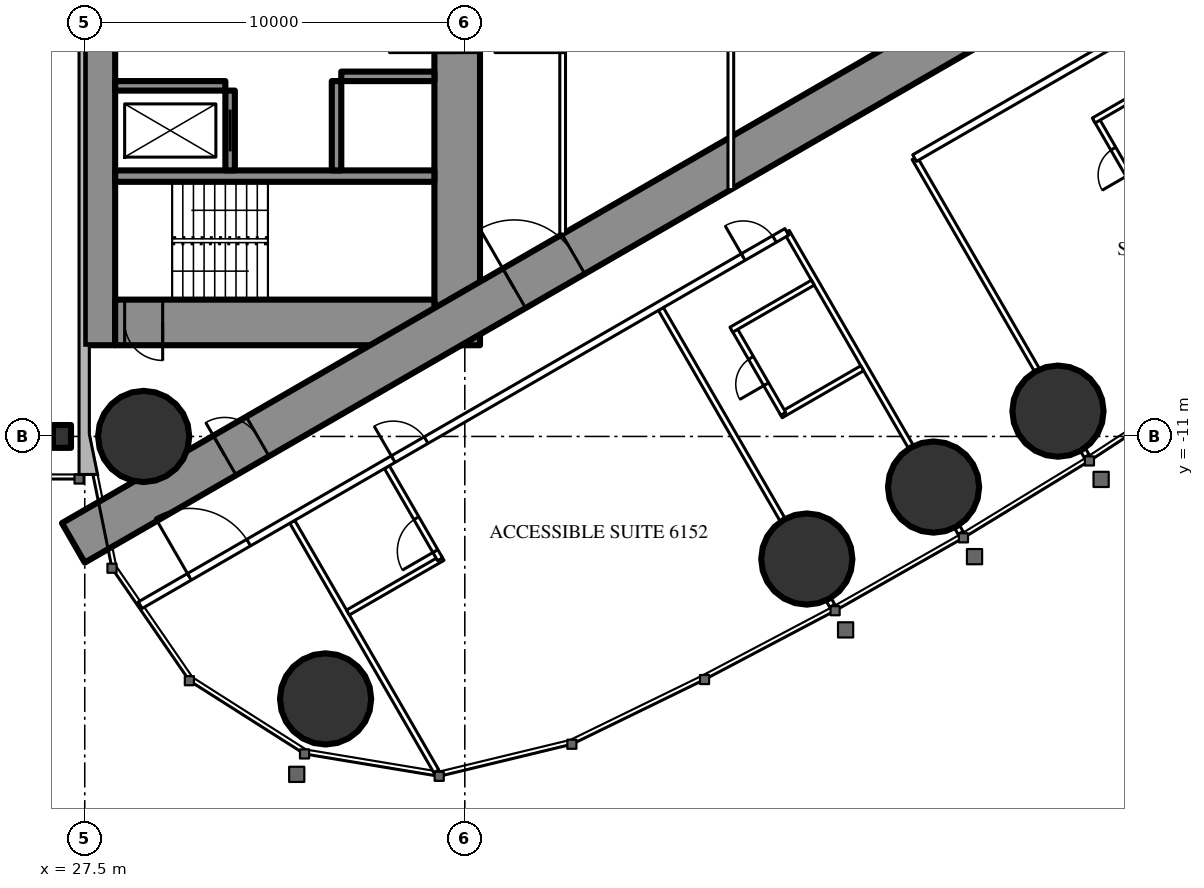
"""IFC4 building model, lengths in metres.
Left out: names, types, materials, properties, quantities, classifications, styles, units other than length and angle.
Written with IfcOpenShell. Run it as: python <this file> out.ifc"""

import sys

from ifc_helpers import new_model, si_unit, direction, frame, frame_2d, origin, origin_2d, place, context, subcontext, project, spatial, rectangle, circle, i_section, extrude, element, fill, save


model = new_model("IFC4")
c1 = context("Model", 3, precision=1e-05, world=origin(), true_north=direction((0.0, 1.0)))
c2 = subcontext(c1, "Body", "Model", "MODEL_VIEW")
j1 = project(units=[si_unit("LENGTHUNIT", "METRE"), si_unit("PLANEANGLEUNIT", "RADIAN")], contexts=[c1])
p1 = place(None, origin())
s1 = spatial("IfcSite", under=j1, at=p1, CompositionType="ELEMENT")
p2 = place(p1, origin())
s2 = spatial("IfcBuilding", under=s1, at=p2, CompositionType="ELEMENT")
p3 = place(p2, frame((0.0, 0.0, 229.7)))
s3 = spatial("IfcBuildingStorey", under=s2, at=p3, CompositionType="ELEMENT", Elevation=229.7)
for number, where, z_axis, x_axis in (
    (1, (33.837, -17.906, 0.0), (0.0, 0.0, 1.0), (1.0, 0.0, 0.0)),
    (2, (29.05, -11.0, 0.0), (0.0, 0.0, 1.0), (1.0, 0.0, 0.0)),
    (3, (46.499, -14.226, 0.0), (0.0, 0.0, 1.0), (1.0, 0.0, 0.0)),
    (4, (49.834, -12.332, 0.0), (0.0, 0.0, 1.0), (1.0, 0.0, 0.0)),
    (5, (53.108, -10.334, 0.0), (0.0, 0.0, 1.0), (1.0, 0.0, 0.0)),
):
    element("IfcColumn", number, at=place(p3, frame(where, z_axis=z_axis, x_axis=x_axis)), inside=s3, PredefinedType="COLUMN", context=c2, shape_type="SweptSolid", body=[
        extrude(circle(Radius=1.2, at=origin_2d()), origin(), (0.0, 0.0, 1.0), 3.6),
    ])
p4 = place(p3, frame((27.9, -8.6, 0.0), z_axis=(0.0, 0.0, 1.0), x_axis=(0.0, 1.0, 0.0)))
e6 = element("IfcWall", 6, at=p4, inside=s3, PredefinedType="SHEAR", context=c2, shape_type="SweptSolid", body=[
    extrude(rectangle(XDim=17.2, YDim=0.8, at=frame_2d((8.6, 0.0))), origin(), (0.0, 0.0, 1.0), 3.6),
])
p5 = place(p4, frame((9.35, 0.0, 0.0)))
e7 = element("IfcOpeningElement", 7, at=p5, cuts=e6, PredefinedType="OPENING", context=c2, shape_type="SweptSolid", body=[
    extrude(rectangle(XDim=0.9, YDim=2.2, at=frame_2d((0.45, 1.1))), frame((0.0, 0.41, 0.0), z_axis=(0.0, -1.0, 0.0), x_axis=(1.0, 0.0, 0.0)), (0.0, 0.0, 1.0), 0.82),
])
p6 = place(p3, frame((37.3, -8.6, 0.0), z_axis=(0.0, 0.0, 1.0), x_axis=(0.0, 1.0, 0.0)))
e8 = element("IfcWall", 8, at=p6, inside=s3, PredefinedType="SHEAR", context=c2, shape_type="SweptSolid", body=[
    extrude(rectangle(XDim=17.2, YDim=1.2, at=frame_2d((8.6, 0.0))), origin(), (0.0, 0.0, 1.0), 3.6),
])
p7 = place(p6, frame((7.7, 0.0, 0.0)))
e9 = element("IfcOpeningElement", 9, at=p7, cuts=e8, PredefinedType="OPENING", context=c2, shape_type="SweptSolid", body=[
    extrude(rectangle(XDim=1.8, YDim=2.2, at=frame_2d((0.9, 1.1))), frame((0.0, 0.61, 0.0), z_axis=(0.0, -1.0, 0.0), x_axis=(1.0, 0.0, 0.0)), (0.0, 0.0, 1.0), 1.22),
])
p8 = place(p3, frame((28.3, -8.0, 0.0), z_axis=(0.0, 0.0, 1.0), x_axis=(1.0, 0.0, 0.0)))
e10 = element("IfcWall", 10, at=p8, inside=s3, PredefinedType="SHEAR", context=c2, shape_type="SweptSolid", body=[
    extrude(rectangle(XDim=8.4, YDim=1.2, at=frame_2d((4.2, 0.0))), origin(), (0.0, 0.0, 1.0), 3.6),
])
p9 = place(p8, frame((0.25, 0.0, 0.0)))
e11 = element("IfcOpeningElement", 11, at=p9, cuts=e10, PredefinedType="OPENING", context=c2, shape_type="SweptSolid", body=[
    extrude(rectangle(XDim=1.0, YDim=2.2, at=frame_2d((0.5, 1.1))), frame((0.0, 0.61, 0.0), z_axis=(0.0, -1.0, 0.0), x_axis=(1.0, 0.0, 0.0)), (0.0, 0.0, 1.0), 1.22),
])
p10 = place(p3, frame((28.3, -4.15, 0.0), z_axis=(0.0, 0.0, 1.0), x_axis=(1.0, 0.0, 0.0)))
e12 = element("IfcWall", 12, at=p10, inside=s3, PredefinedType="SHEAR", context=c2, shape_type="SweptSolid", body=[
    extrude(rectangle(XDim=8.4, YDim=0.3, at=frame_2d((4.2, 0.0))), origin(), (0.0, 0.0, 1.0), 3.6),
])
p11 = place(p3, frame((31.325, -4.0, 0.0), z_axis=(0.0, 0.0, 1.0), x_axis=(0.0, 1.0, 0.0)))
e13 = element("IfcWall", 13, at=p11, inside=s3, PredefinedType="SHEAR", context=c2, shape_type="SweptSolid", body=[
    extrude(rectangle(XDim=2.1, YDim=0.25, at=frame_2d((1.05, 0.0))), origin(), (0.0, 0.0, 1.0), 3.6),
])
p12 = place(p11, frame((0.5, 0.0, 0.0)))
e14 = element("IfcOpeningElement", 14, at=p12, cuts=e13, PredefinedType="OPENING", context=c2, shape_type="SweptSolid", body=[
    extrude(rectangle(XDim=1.1, YDim=2.2, at=frame_2d((0.55, 1.1))), frame((0.0, 0.135, 0.0), z_axis=(0.0, -1.0, 0.0), x_axis=(1.0, 0.0, 0.0)), (0.0, 0.0, 1.0), 0.27),
])
p13 = place(p3, frame((34.125, -4.0, 0.0), z_axis=(0.0, 0.0, 1.0), x_axis=(0.0, 1.0, 0.0)))
e15 = element("IfcWall", 15, at=p13, inside=s3, PredefinedType="SHEAR", context=c2, shape_type="SweptSolid", body=[
    extrude(rectangle(XDim=2.35, YDim=0.25, at=frame_2d((1.175, 0.0))), origin(), (0.0, 0.0, 1.0), 3.6),
])
p14 = place(p3, frame((28.3, -1.775, 0.0), z_axis=(0.0, 0.0, 1.0), x_axis=(1.0, 0.0, 0.0)))
e16 = element("IfcWall", 16, at=p14, inside=s3, PredefinedType="SHEAR", context=c2, shape_type="SweptSolid", body=[
    extrude(rectangle(XDim=2.9, YDim=0.25, at=frame_2d((1.45, 0.0))), origin(), (0.0, 0.0, 1.0), 3.6),
])
p15 = place(p3, frame((34.25, -1.525, 0.0), z_axis=(0.0, 0.0, 1.0), x_axis=(1.0, 0.0, 0.0)))
e17 = element("IfcWall", 17, at=p15, inside=s3, PredefinedType="SHEAR", context=c2, shape_type="SweptSolid", body=[
    extrude(rectangle(XDim=2.45, YDim=0.25, at=frame_2d((1.225, 0.0))), origin(), (0.0, 0.0, 1.0), 3.6),
])
p16 = place(p3, frame((27.2, -13.8, 0.0), z_axis=(0.0, 0.0, 1.0), x_axis=(0.866027159892, 0.499996958321, 0.0)))
e18 = element("IfcWall", 18, at=p16, inside=s3, PredefinedType="SHEAR", context=c2, shape_type="SweptSolid", body=[
    extrude(rectangle(XDim=27.947, YDim=1.2, at=frame_2d((13.973, 0.0))), origin(), (0.0, 0.0, 1.0), 3.6),
])
p17 = place(p16, frame((4.6, 0.0, 0.0)))
e19 = element("IfcOpeningElement", 19, at=p17, cuts=e18, PredefinedType="OPENING", context=c2, shape_type="SweptSolid", body=[
    extrude(rectangle(XDim=1.0, YDim=2.2, at=frame_2d((0.5, 1.1))), frame((0.0, 0.61, 0.0), z_axis=(0.0, -1.0, 0.0), x_axis=(1.0, 0.0, 0.0)), (0.0, 0.0, 1.0), 1.22),
])
p18 = place(p16, frame((13.395, 0.0, 0.0)))
e20 = element("IfcOpeningElement", 20, at=p18, cuts=e18, PredefinedType="OPENING", context=c2, shape_type="SweptSolid", body=[
    extrude(rectangle(XDim=1.8, YDim=2.2, at=frame_2d((0.9, 1.1))), frame((0.0, 0.61, 0.0), z_axis=(0.0, -1.0, 0.0), x_axis=(1.0, 0.0, 0.0)), (0.0, 0.0, 1.0), 1.22),
])
p19 = place(p3, frame((26.9, -11.0, 0.0), z_axis=(0.0, 0.0, 1.0), x_axis=(1.0, 0.0, 0.0)))
e21 = element("IfcColumn", 21, at=p19, inside=s3, PredefinedType="COLUMN", context=c2, shape_type="SweptSolid", body=[
    extrude(i_section(OverallWidth=0.476, OverallDepth=0.6, WebThickness=0.1, FlangeThickness=0.14, FilletRadius=0.02, at=origin_2d()), origin(), (0.0, 0.0, 1.0), 3.6),
])
p20 = place(p3, frame((32.96, -13.246, 0.0), z_axis=(0.0, 0.0, 1.0), x_axis=(0.500000236886, -0.866025267018, 0.0)))
e22 = element("IfcWall", 22, at=p20, inside=s3, PredefinedType="PARTITIONING", context=c2, shape_type="SweptSolid", body=[
    extrude(rectangle(XDim=7.583, YDim=0.15, at=frame_2d((3.791, 0.0))), origin(), (0.0, 0.0, 1.0), 3.35),
])
p21 = place(p3, frame((42.66, -7.646, 0.0), z_axis=(0.0, 0.0, 1.0), x_axis=(0.499996592859, -0.866027370889, 0.0)))
e23 = element("IfcWall", 23, at=p21, inside=s3, PredefinedType="PARTITIONING", context=c2, shape_type="SweptSolid", body=[
    extrude(rectangle(XDim=6.398, YDim=0.15, at=frame_2d((3.199, 0.0))), origin(), (0.0, 0.0, 1.0), 2.45),
])
p22 = place(p3, frame((47.079, -15.3, 0.0), z_axis=(0.0, 0.0, 1.0), x_axis=(0.499212083968, -0.866479829667, 0.0)))
e24 = element("IfcWall", 24, at=p22, inside=s3, PredefinedType="PARTITIONING", context=c2, shape_type="SweptSolid", body=[
    extrude(rectangle(XDim=0.179, YDim=0.15, at=frame_2d((0.09, 0.0))), origin(), (0.0, 0.0, 1.0), 2.45),
])
p23 = place(p3, frame((45.973, -5.617, 0.0), z_axis=(0.0, 0.0, 1.0), x_axis=(0.499985856986, -0.866033569104, 0.0)))
e25 = element("IfcWall", 25, at=p23, inside=s3, PredefinedType="PARTITIONING", context=c2, shape_type="SweptSolid", body=[
    extrude(rectangle(XDim=6.526, YDim=0.15, at=frame_2d((3.263, 0.0))), origin(), (0.0, 0.0, 1.0), 2.45),
])
p24 = place(p3, frame((50.456, -13.382, 0.0), z_axis=(0.0, 0.0, 1.0), x_axis=(0.500661834965, -0.865642955848, 0.0)))
e26 = element("IfcWall", 26, at=p24, inside=s3, PredefinedType="PARTITIONING", context=c2, shape_type="SweptSolid", body=[
    extrude(rectangle(XDim=0.18, YDim=0.15, at=frame_2d((0.09, 0.0))), origin(), (0.0, 0.0, 1.0), 2.45),
])
p25 = place(p3, frame((49.335, -3.676, 0.0), z_axis=(0.0, 0.0, 1.0), x_axis=(0.500000613642, -0.866025049498, 0.0)))
e27 = element("IfcWall", 27, at=p25, inside=s3, PredefinedType="PARTITIONING", context=c2, shape_type="SweptSolid", body=[
    extrude(rectangle(XDim=6.433, YDim=0.15, at=frame_2d((3.216, 0.0))), origin(), (0.0, 0.0, 1.0), 2.45),
])
p26 = place(p3, frame((53.771, -11.36, 0.0), z_axis=(0.0, 0.0, 1.0), x_axis=(0.499524978789, -0.866299483762, 0.0)))
e28 = element("IfcWall", 28, at=p26, inside=s3, PredefinedType="PARTITIONING", context=c2, shape_type="SweptSolid", body=[
    extrude(rectangle(XDim=0.178, YDim=0.15, at=frame_2d((0.089, 0.0))), origin(), (0.0, 0.0, 1.0), 2.45),
])
p27 = place(p3, frame((34.425, -15.633, 0.0), z_axis=(0.0, 0.0, 1.0), x_axis=(0.866018712932, 0.500011588718, 0.0)))
e29 = element("IfcWall", 29, at=p27, inside=s3, PredefinedType="PARTITIONING", context=c2, shape_type="SweptSolid", body=[
    extrude(rectangle(XDim=2.875, YDim=0.15, at=frame_2d((1.438, 0.0))), origin(), (0.0, 0.0, 1.0), 3.35),
])
p28 = place(p3, frame((35.45, -11.808, 0.0), z_axis=(0.0, 0.0, 1.0), x_axis=(0.49994636267, -0.866056369097, 0.0)))
e30 = element("IfcWall", 30, at=p28, inside=s3, PredefinedType="PARTITIONING", context=c2, shape_type="SweptSolid", body=[
    extrude(rectangle(XDim=2.8, YDim=0.15, at=frame_2d((1.4, 0.0))), origin(), (0.0, 0.0, 1.0), 3.35),
])
p29 = place(p28, frame((1.55, 0.0, 0.0)))
e31 = element("IfcOpeningElement", 31, at=p29, cuts=e30, PredefinedType="OPENING", context=c2, shape_type="SweptSolid", body=[
    extrude(rectangle(XDim=1.0, YDim=2.2, at=frame_2d((0.5, 1.1))), frame((0.0, 0.085, 0.0), z_axis=(0.0, -1.0, 0.0), x_axis=(1.0, 0.0, 0.0)), (0.0, 0.0, 1.0), 0.17),
])
p30 = place(p3, frame((45.814, -10.443, 0.0), z_axis=(0.0, 0.0, 1.0), x_axis=(0.866073894602, 0.499916002032, 0.0)))
e32 = element("IfcWall", 32, at=p30, inside=s3, PredefinedType="PARTITIONING", context=c2, shape_type="SweptSolid", body=[
    extrude(rectangle(XDim=2.475, YDim=0.15, at=frame_2d((1.238, 0.0))), origin(), (0.0, 0.0, 1.0), 3.35),
])
p31 = place(p3, frame((44.579, -8.154, 0.0), z_axis=(0.0, 0.0, 1.0), x_axis=(0.500006934395, -0.866021400173, 0.0)))
e33 = element("IfcWall", 33, at=p31, inside=s3, PredefinedType="PARTITIONING", context=c2, shape_type="SweptSolid", body=[
    extrude(rectangle(XDim=2.6, YDim=0.15, at=frame_2d((1.3, 0.0))), origin(), (0.0, 0.0, 1.0), 3.35),
])
p32 = place(p31, frame((0.9, 0.0, 0.0)))
e34 = element("IfcOpeningElement", 34, at=p32, cuts=e33, PredefinedType="OPENING", context=c2, shape_type="SweptSolid", body=[
    extrude(rectangle(XDim=0.8, YDim=2.2, at=frame_2d((0.4, 1.1))), frame((0.0, 0.085, 0.0), z_axis=(0.0, -1.0, 0.0), x_axis=(1.0, 0.0, 0.0)), (0.0, 0.0, 1.0), 0.17),
])
p33 = place(p3, frame((44.514, -8.191, 0.0), z_axis=(0.0, 0.0, 1.0), x_axis=(0.866031185235, 0.4999899861, 0.0)))
e35 = element("IfcWall", 35, at=p33, inside=s3, PredefinedType="PARTITIONING", context=c2, shape_type="SweptSolid", body=[
    extrude(rectangle(XDim=2.475, YDim=0.15, at=frame_2d((1.238, 0.0))), origin(), (0.0, 0.0, 1.0), 3.35),
])
p34 = place(p3, frame((54.114, -2.649, 0.0), z_axis=(0.0, 0.0, 1.0), x_axis=(0.500006934395, -0.866021400173, 0.0)))
e36 = element("IfcWall", 36, at=p34, inside=s3, PredefinedType="PARTITIONING", context=c2, shape_type="SweptSolid", body=[
    extrude(rectangle(XDim=2.6, YDim=0.15, at=frame_2d((1.3, 0.0))), origin(), (0.0, 0.0, 1.0), 3.35),
])
p35 = place(p34, frame((0.9, 0.0, 0.0)))
e37 = element("IfcOpeningElement", 37, at=p35, cuts=e36, PredefinedType="OPENING", context=c2, shape_type="SweptSolid", body=[
    extrude(rectangle(XDim=0.8, YDim=2.2, at=frame_2d((0.4, 1.1))), frame((0.0, 0.085, 0.0), z_axis=(0.0, -1.0, 0.0), x_axis=(1.0, 0.0, 0.0)), (0.0, 0.0, 1.0), 0.17),
])
p36 = place(p3, frame((54.049, -2.687, 0.0), z_axis=(0.0, 0.0, 1.0), x_axis=(0.866006523861, 0.500032699561, 0.0)))
e38 = element("IfcWall", 38, at=p36, inside=s3, PredefinedType="PARTITIONING", context=c2, shape_type="SweptSolid", body=[
    extrude(rectangle(XDim=2.475, YDim=0.15, at=frame_2d((1.237, 0.0))), origin(), (0.0, 0.0, 1.0), 3.35),
])
p37 = place(p3, frame((28.959, -15.44, 0.0), z_axis=(0.0, 0.0, 1.0), x_axis=(0.866025204199, 0.500000345692, 0.0)))
e39 = element("IfcWall", 39, at=p37, inside=s3, PredefinedType="PARTITIONING", context=c2, shape_type="SweptSolid", body=[
    extrude(rectangle(XDim=19.646, YDim=0.2, at=frame_2d((9.823, 0.0))), origin(), (0.0, 0.0, 1.0), 3.35),
])
p38 = place(p37, frame((1.494, 0.0, 0.0)))
e40 = element("IfcOpeningElement", 40, at=p38, cuts=e39, PredefinedType="OPENING", context=c2, shape_type="SweptSolid", body=[
    extrude(rectangle(XDim=1.8, YDim=2.04, at=frame_2d((0.9, 1.02))), frame((0.0, 0.11, 0.0), z_axis=(0.0, -1.0, 0.0), x_axis=(1.0, 0.0, 0.0)), (0.0, 0.0, 1.0), 0.22),
])
p39 = place(p37, frame((7.687, 0.0, 0.0)))
e41 = element("IfcOpeningElement", 41, at=p39, cuts=e39, PredefinedType="OPENING", context=c2, shape_type="SweptSolid", body=[
    extrude(rectangle(XDim=1.0, YDim=2.2, at=frame_2d((0.5, 1.1))), frame((0.0, 0.11, 0.0), z_axis=(0.0, -1.0, 0.0), x_axis=(1.0, 0.0, 0.0)), (0.0, 0.0, 1.0), 0.22),
])
p40 = place(p37, frame((18.321, 0.0, 0.0)))
e42 = element("IfcOpeningElement", 42, at=p40, cuts=e39, PredefinedType="OPENING", context=c2, shape_type="SweptSolid", body=[
    extrude(rectangle(XDim=0.95, YDim=2.2, at=frame_2d((0.475, 1.1))), frame((0.0, 0.11, 0.0), z_axis=(0.0, -1.0, 0.0), x_axis=(1.0, 0.0, 0.0)), (0.0, 0.0, 1.0), 0.22),
])
p41 = place(p3, frame((49.335, -3.676, 0.0), z_axis=(0.0, 0.0, 1.0), x_axis=(0.866021344046, 0.500007031608, 0.0)))
e43 = element("IfcWall", 43, at=p41, inside=s3, PredefinedType="PARTITIONING", context=c2, shape_type="SweptSolid", body=[
    extrude(rectangle(XDim=7.352, YDim=0.2, at=frame_2d((3.676, 0.0))), origin(), (0.0, 0.0, 1.0), 3.35),
])
p42 = place(p41, frame((5.802, 0.0, 0.0)))
e44 = element("IfcOpeningElement", 44, at=p42, cuts=e43, PredefinedType="OPENING", context=c2, shape_type="SweptSolid", body=[
    extrude(rectangle(XDim=0.95, YDim=2.2, at=frame_2d((0.475, 1.1))), frame((0.0, 0.11, 0.0), z_axis=(0.0, -1.0, 0.0), x_axis=(1.0, 0.0, 0.0)), (0.0, 0.0, 1.0), 0.22),
])
p43 = place(p3, frame((40.075, -5.674, 0.0), z_axis=(0.0, 0.0, 1.0), x_axis=(0.0, 1.0, 0.0)))
e45 = element("IfcWall", 45, at=p43, inside=s3, PredefinedType="PARTITIONING", context=c2, shape_type="SweptSolid", body=[
    extrude(rectangle(XDim=11.348, YDim=0.15, at=frame_2d((5.674, 0.0))), origin(), (0.0, 0.0, 1.0), 3.35),
])
p44 = place(p43, frame((4.774, 0.0, 0.0)))
e46 = element("IfcOpeningElement", 46, at=p44, cuts=e45, PredefinedType="OPENING", context=c2, shape_type="SweptSolid", body=[
    extrude(rectangle(XDim=1.8, YDim=2.2, at=frame_2d((0.9, 1.1))), frame((0.0, 0.085, 0.0), z_axis=(0.0, -1.0, 0.0), x_axis=(1.0, 0.0, 0.0)), (0.0, 0.0, 1.0), 0.17),
])
p45 = place(p3, frame((44.5, -4.505, 0.0), z_axis=(0.0, 0.0, 1.0), x_axis=(0.0, 1.0, 0.0)))
e47 = element("IfcWall", 47, at=p45, inside=s3, PredefinedType="PARTITIONING", context=c2, shape_type="SweptSolid", body=[
    extrude(rectangle(XDim=9.009, YDim=0.15, at=frame_2d((4.505, 0.0))), origin(), (0.0, 0.0, 1.0), 3.35),
])
p46 = place(p45, frame((4.005, 0.0, 0.0)))
e48 = element("IfcOpeningElement", 48, at=p46, cuts=e47, PredefinedType="OPENING", context=c2, shape_type="SweptSolid", body=[
    extrude(rectangle(XDim=1.0, YDim=2.2, at=frame_2d((0.5, 1.1))), frame((0.0, 0.085, 0.0), z_axis=(0.0, -1.0, 0.0), x_axis=(1.0, 0.0, 0.0)), (0.0, 0.0, 1.0), 0.17),
])
p47 = place(p38, origin())
e49 = element("IfcDoor", 49, at=p47, inside=s3, OperationType="DOUBLE_DOOR_SINGLE_SWING", PredefinedType="DOOR", context=c2, shape_type="SweptSolid", body=[
    extrude(rectangle(XDim=1.8, YDim=2.04, at=frame_2d((0.9, 1.02))), frame((0.0, 0.025, 0.0), z_axis=(0.0, -1.0, 0.0), x_axis=(1.0, 0.0, 0.0)), (0.0, 0.0, 1.0), 0.05),
])
fill(e40, e49)
p48 = place(p29, origin())
e50 = element("IfcDoor", 50, at=p48, inside=s3, OperationType="SINGLE_SWING_RIGHT", PredefinedType="DOOR", context=c2, shape_type="SweptSolid", body=[
    extrude(rectangle(XDim=1.0, YDim=2.2, at=frame_2d((0.5, 1.1))), frame((0.0, 0.025, 0.0), z_axis=(0.0, -1.0, 0.0), x_axis=(1.0, 0.0, 0.0)), (0.0, 0.0, 1.0), 0.05),
])
fill(e31, e50)
p49 = place(p39, origin())
e51 = element("IfcDoor", 51, at=p49, inside=s3, OperationType="SINGLE_SWING_LEFT", PredefinedType="DOOR", context=c2, shape_type="SweptSolid", body=[
    extrude(rectangle(XDim=1.0, YDim=2.2, at=frame_2d((0.5, 1.1))), frame((0.0, 0.025, 0.0), z_axis=(0.0, -1.0, 0.0), x_axis=(1.0, 0.0, 0.0)), (0.0, 0.0, 1.0), 0.05),
])
fill(e41, e51)
p50 = place(p32, origin())
e52 = element("IfcDoor", 52, at=p50, inside=s3, OperationType="SINGLE_SWING_RIGHT", PredefinedType="DOOR", context=c2, shape_type="SweptSolid", body=[
    extrude(rectangle(XDim=0.8, YDim=2.2, at=frame_2d((0.4, 1.1))), frame((0.0, 0.025, 0.0), z_axis=(0.0, -1.0, 0.0), x_axis=(1.0, 0.0, 0.0)), (0.0, 0.0, 1.0), 0.05),
])
fill(e34, e52)
p51 = place(p40, origin())
e53 = element("IfcDoor", 53, at=p51, inside=s3, OperationType="SINGLE_SWING_LEFT", PredefinedType="DOOR", context=c2, shape_type="SweptSolid", body=[
    extrude(rectangle(XDim=0.95, YDim=2.2, at=frame_2d((0.475, 1.1))), frame((0.0, 0.025, 0.0), z_axis=(0.0, -1.0, 0.0), x_axis=(1.0, 0.0, 0.0)), (0.0, 0.0, 1.0), 0.05),
])
fill(e42, e53)
p52 = place(p35, origin())
e54 = element("IfcDoor", 54, at=p52, inside=s3, OperationType="SINGLE_SWING_RIGHT", PredefinedType="DOOR", context=c2, shape_type="SweptSolid", body=[
    extrude(rectangle(XDim=0.8, YDim=2.2, at=frame_2d((0.4, 1.1))), frame((0.0, 0.025, 0.0), z_axis=(0.0, -1.0, 0.0), x_axis=(1.0, 0.0, 0.0)), (0.0, 0.0, 1.0), 0.05),
])
fill(e37, e54)
p53 = place(p44, origin())
e55 = element("IfcDoor", 55, at=p53, inside=s3, OperationType="DOUBLE_DOOR_SINGLE_SWING", PredefinedType="DOOR", context=c2, shape_type="SweptSolid", body=[
    extrude(rectangle(XDim=1.8, YDim=2.2, at=frame_2d((0.9, 1.1))), frame((0.0, 0.025, 0.0), z_axis=(0.0, -1.0, 0.0), x_axis=(1.0, 0.0, 0.0)), (0.0, 0.0, 1.0), 0.05),
])
fill(e46, e55)
p54 = place(p17, origin())
e56 = element("IfcDoor", 56, at=p54, inside=s3, OperationType="SINGLE_SWING_LEFT", PredefinedType="DOOR", context=c2, shape_type="SweptSolid", body=[
    extrude(rectangle(XDim=1.0, YDim=2.2, at=frame_2d((0.5, 1.1))), frame((0.0, 0.025, 0.0), z_axis=(0.0, -1.0, 0.0), x_axis=(1.0, 0.0, 0.0)), (0.0, 0.0, 1.0), 0.05),
])
fill(e19, e56)
p55 = place(p18, origin())
e57 = element("IfcDoor", 57, at=p55, inside=s3, OperationType="DOUBLE_DOOR_SINGLE_SWING", PredefinedType="DOOR", context=c2, shape_type="SweptSolid", body=[
    extrude(rectangle(XDim=1.8, YDim=2.2, at=frame_2d((0.9, 1.1))), frame((0.0, 0.025, 0.0), z_axis=(0.0, -1.0, 0.0), x_axis=(1.0, 0.0, 0.0)), (0.0, 0.0, 1.0), 0.05),
])
fill(e20, e57)
p56 = place(p7, origin())
e58 = element("IfcDoor", 58, at=p56, inside=s3, OperationType="DOUBLE_DOOR_SINGLE_SWING", PredefinedType="DOOR", context=c2, shape_type="SweptSolid", body=[
    extrude(rectangle(XDim=1.8, YDim=2.2, at=frame_2d((0.9, 1.1))), frame((0.0, 0.025, 0.0), z_axis=(0.0, -1.0, 0.0), x_axis=(1.0, 0.0, 0.0)), (0.0, 0.0, 1.0), 0.05),
])
fill(e9, e58)
p57 = place(p9, origin())
e59 = element("IfcDoor", 59, at=p57, inside=s3, OperationType="SINGLE_SWING_RIGHT", PredefinedType="DOOR", context=c2, shape_type="SweptSolid", body=[
    extrude(rectangle(XDim=1.0, YDim=2.2, at=frame_2d((0.5, 1.1))), frame((0.0, 0.025, 0.0), z_axis=(0.0, -1.0, 0.0), x_axis=(1.0, 0.0, 0.0)), (0.0, 0.0, 1.0), 0.05),
])
fill(e11, e59)
p58 = place(p12, origin())
e60 = element("IfcDoor", 60, at=p58, inside=s3, OperationType="SLIDING_TO_LEFT", PredefinedType="USERDEFINED", context=c2, shape_type="SweptSolid", body=[
    extrude(rectangle(XDim=1.1, YDim=2.2, at=frame_2d((0.55, 1.1))), frame((0.0, 0.025, 0.0), z_axis=(0.0, -1.0, 0.0), x_axis=(1.0, 0.0, 0.0)), (0.0, 0.0, 1.0), 0.05),
])
fill(e14, e60)
save(model, sys.argv[1])
